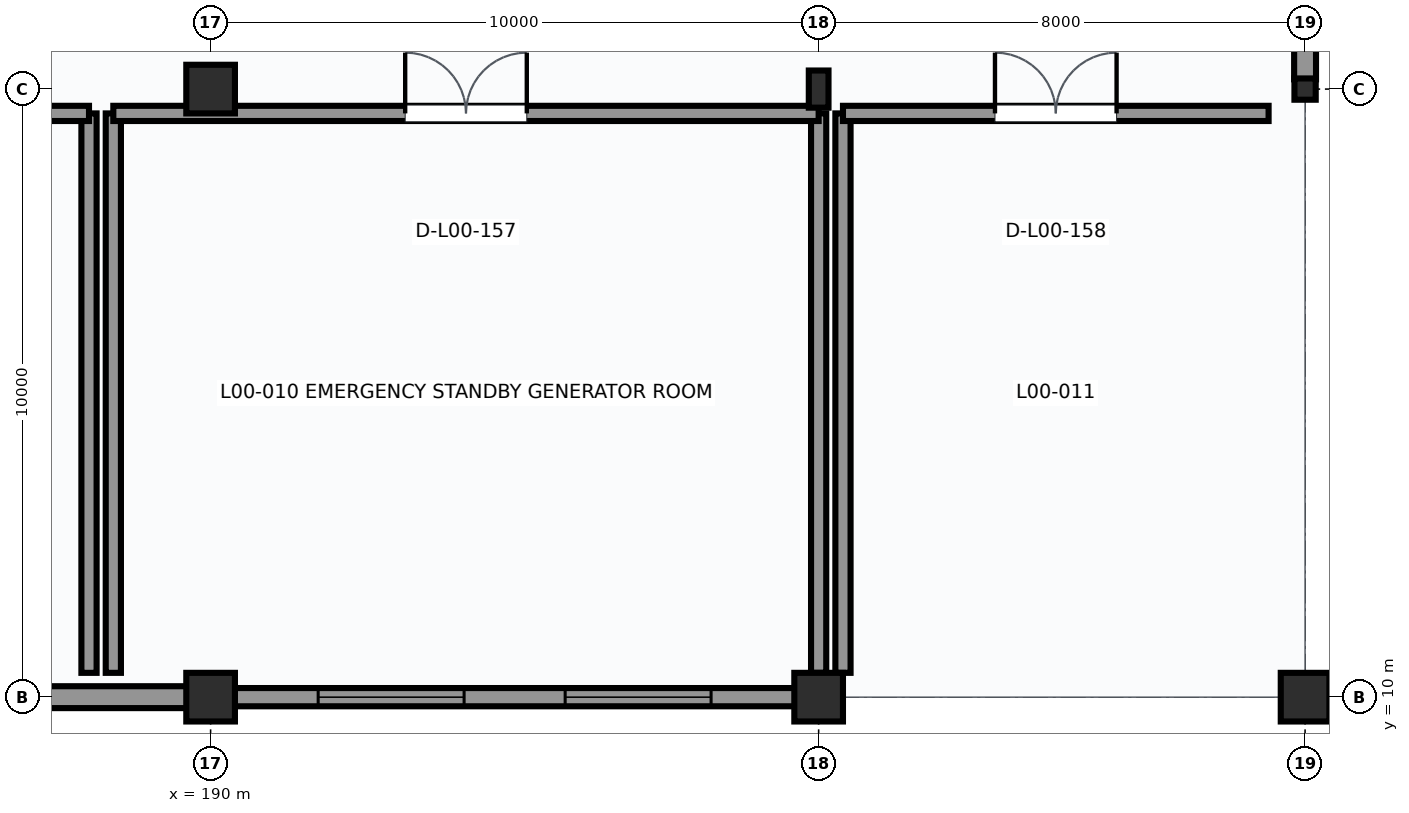
"""IFC4 building model, lengths in metres.
Left out: names, types, materials, properties, quantities, classifications, styles, units other than length and angle.
Written with IfcOpenShell. Run it as: python <this file> out.ifc"""

import sys

from ifc_helpers import new_model, si_unit, direction, frame, frame_2d, origin, origin_2d, place, context, subcontext, project, spatial, rectangle, hollow_rectangle, i_section, extrude, element, fill, save


model = new_model("IFC4")
c1 = context("Model", 3, precision=1e-05, world=origin(), true_north=direction((0.0, 1.0)))
c2 = subcontext(c1, "Body", "Model", "MODEL_VIEW")
j1 = project(units=[si_unit("LENGTHUNIT", "METRE"), si_unit("PLANEANGLEUNIT", "RADIAN")], contexts=[c1])
p1 = place(None, origin())
s1 = spatial("IfcSite", under=j1, at=p1, CompositionType="ELEMENT")
p2 = place(p1, origin())
s2 = spatial("IfcBuilding", under=s1, at=p2, CompositionType="ELEMENT")
p3 = place(p2, origin())
s3 = spatial("IfcBuildingStorey", under=s2, at=p3, CompositionType="ELEMENT", Elevation=0.0)
for number, where, z_axis, x_axis in (
    (1, (190.0, 10.0, 0.0), (0.0, 0.0, 1.0), (1.0, 0.0, 0.0)),
    (2, (190.0, 20.0, 0.0), (0.0, 0.0, 1.0), (1.0, 0.0, 0.0)),
    (3, (200.0, 10.0, 0.0), (0.0, 0.0, 1.0), (1.0, 0.0, 0.0)),
):
    element("IfcColumn", number, at=place(p3, frame(where, z_axis=z_axis, x_axis=x_axis)), inside=s3, PredefinedType="COLUMN", context=c2, shape_type="SweptSolid", body=[
        extrude(rectangle(XDim=0.8, YDim=0.8, at=origin_2d()), origin(), (0.0, 0.0, 1.0), 5.4),
    ])
p4 = place(p3, frame((200.0, 20.0, 0.0), z_axis=(0.0, 0.0, 1.0), x_axis=(1.0, 0.0, 0.0)))
e4 = element("IfcColumn", 4, at=p4, inside=s3, PredefinedType="COLUMN", context=c2, shape_type="SweptSolid", body=[
    extrude(i_section(OverallWidth=0.324, OverallDepth=0.611, WebThickness=0.013, FlangeThickness=0.019, FilletRadius=0.016, at=origin_2d()), origin(), (0.0, 0.0, 1.0), 5.4),
])
p5 = place(p3, frame((208.0, 10.0, 0.0), z_axis=(0.0, 0.0, 1.0), x_axis=(1.0, 0.0, 0.0)))
e5 = element("IfcColumn", 5, at=p5, inside=s3, PredefinedType="COLUMN", context=c2, shape_type="SweptSolid", body=[
    extrude(rectangle(XDim=0.8, YDim=0.8, at=origin_2d()), origin(), (0.0, 0.0, 1.0), 5.4),
])
p6 = place(p3, frame((208.0, 20.0, 0.0), z_axis=(0.0, 0.0, 1.0), x_axis=(1.0, 0.0, 0.0)))
e6 = element("IfcColumn", 6, at=p6, inside=s3, PredefinedType="COLUMN", context=c2, shape_type="SweptSolid", body=[
    extrude(hollow_rectangle(XDim=0.35, YDim=0.35, WallThickness=0.016, InnerFilletRadius=0.016, OuterFilletRadius=0.032, at=origin_2d()), origin(), (0.0, 0.0, 1.0), 5.4),
])
p7 = place(p3, frame((190.385, 10.0, 0.0), z_axis=(0.0, 0.0, 1.0), x_axis=(1.0, 0.0, 0.0)))
e7 = element("IfcWall", 7, at=p7, inside=s3, PredefinedType="SOLIDWALL", context=c2, shape_type="SweptSolid", body=[
    extrude(rectangle(XDim=9.23, YDim=0.3, at=frame_2d((4.615, 0.0))), origin(), (0.0, 0.0, 1.0), 5.06),
])
p8 = place(p7, frame((1.384, 0.0, 0.9)))
e8 = element("IfcOpeningElement", 8, at=p8, cuts=e7, PredefinedType="OPENING", context=c2, shape_type="SweptSolid", body=[
    extrude(rectangle(XDim=2.4, YDim=1.8, at=frame_2d((1.2, 0.9))), frame((0.0, 0.16, 0.0), z_axis=(0.0, -1.0, 0.0), x_axis=(1.0, 0.0, 0.0)), (0.0, 0.0, 1.0), 0.32),
])
p9 = place(p7, frame((5.446, 0.0, 0.9)))
e9 = element("IfcOpeningElement", 9, at=p9, cuts=e7, PredefinedType="OPENING", context=c2, shape_type="SweptSolid", body=[
    extrude(rectangle(XDim=2.4, YDim=2.1, at=frame_2d((1.2, 1.05))), frame((0.0, 0.16, 0.0), z_axis=(0.0, -1.0, 0.0), x_axis=(1.0, 0.0, 0.0)), (0.0, 0.0, 1.0), 0.32),
])
p10 = place(p3, frame((180.385, 10.0, 0.0), z_axis=(0.0, 0.0, 1.0), x_axis=(1.0, 0.0, 0.0)))
e10 = element("IfcWall", 10, at=p10, inside=s3, PredefinedType="SOLIDWALL", context=c2, shape_type="SweptSolid", body=[
    extrude(rectangle(XDim=9.23, YDim=0.36, at=frame_2d((4.615, 0.0))), origin(), (0.0, 0.0, 1.0), 5.06),
])
p11 = place(p10, frame((3.015, 0.0, 0.0)))
e11 = element("IfcOpeningElement", 11, at=p11, cuts=e10, PredefinedType="OPENING", context=c2, shape_type="SweptSolid", body=[
    extrude(rectangle(XDim=3.2, YDim=2.6, at=frame_2d((1.6, 1.3))), frame((0.0, 0.19, 0.0), z_axis=(0.0, -1.0, 0.0), x_axis=(1.0, 0.0, 0.0)), (0.0, 0.0, 1.0), 0.38),
])
p12 = place(p3, frame((208.0, 20.16, 0.0), z_axis=(0.0, 0.0, 1.0), x_axis=(0.0, 1.0, 0.0)))
e12 = element("IfcWall", 12, at=p12, inside=s3, PredefinedType="SOLIDWALL", context=c2, shape_type="SweptSolid", body=[
    extrude(rectangle(XDim=10.455, YDim=0.36, at=frame_2d((5.228, 0.0))), origin(), (0.0, 0.0, 1.0), 4.7),
])
p13 = place(p12, frame((2.978, 0.0, 0.0)))
e13 = element("IfcOpeningElement", 13, at=p13, cuts=e12, PredefinedType="OPENING", context=c2, shape_type="SweptSolid", body=[
    extrude(rectangle(XDim=4.5, YDim=4.4, at=frame_2d((2.25, 2.2))), frame((0.0, 0.19, 0.0), z_axis=(0.0, -1.0, 0.0), x_axis=(1.0, 0.0, 0.0)), (0.0, 0.0, 1.0), 0.38),
])
p14 = place(p3, frame((188.0, 19.6, 0.0), z_axis=(0.0, 0.0, 1.0), x_axis=(0.0, -1.0, 0.0)))
e14 = element("IfcWall", 14, at=p14, inside=s3, PredefinedType="SOLIDWALL", context=c2, shape_type="SweptSolid", body=[
    extrude(rectangle(XDim=9.2, YDim=0.25, at=frame_2d((4.6, 0.0))), origin(), (0.0, 0.0, 1.0), 4.04),
])
p15 = place(p3, frame((168.4, 19.6, 0.0), z_axis=(0.0, 0.0, 1.0), x_axis=(1.0, 0.0, 0.0)))
e15 = element("IfcWall", 15, at=p15, inside=s3, PredefinedType="SOLIDWALL", context=c2, shape_type="SweptSolid", body=[
    extrude(rectangle(XDim=19.6, YDim=0.25, at=frame_2d((9.8, 0.0))), origin(), (0.0, 0.0, 1.0), 4.04),
])
p16 = place(p15, frame((6.448, 0.0, 0.0)))
e16 = element("IfcOpeningElement", 16, at=p16, cuts=e15, PredefinedType="OPENING", context=c2, shape_type="SweptSolid", body=[
    extrude(rectangle(XDim=2.0, YDim=2.4, at=frame_2d((1.0, 1.2))), frame((0.0, 0.135, 0.0), z_axis=(0.0, -1.0, 0.0), x_axis=(1.0, 0.0, 0.0)), (0.0, 0.0, 1.0), 0.27),
])
p17 = place(p3, frame((200.0, 19.6, 0.0), z_axis=(0.0, 0.0, 1.0), x_axis=(0.0, -1.0, 0.0)))
e17 = element("IfcWall", 17, at=p17, inside=s3, PredefinedType="SOLIDWALL", context=c2, shape_type="SweptSolid", body=[
    extrude(rectangle(XDim=9.2, YDim=0.25, at=frame_2d((4.6, 0.0))), origin(), (0.0, 0.0, 1.0), 5.06),
])
p18 = place(p3, frame((188.4, 10.4, 0.0), z_axis=(0.0, 0.0, 1.0), x_axis=(0.0, 1.0, 0.0)))
e18 = element("IfcWall", 18, at=p18, inside=s3, PredefinedType="SOLIDWALL", context=c2, shape_type="SweptSolid", body=[
    extrude(rectangle(XDim=9.2, YDim=0.25, at=frame_2d((4.6, 0.0))), origin(), (0.0, 0.0, 1.0), 4.04),
])
p19 = place(p3, frame((188.4, 19.6, 0.0), z_axis=(0.0, 0.0, 1.0), x_axis=(1.0, 0.0, 0.0)))
e19 = element("IfcWall", 19, at=p19, inside=s3, PredefinedType="SOLIDWALL", context=c2, shape_type="SweptSolid", body=[
    extrude(rectangle(XDim=11.6, YDim=0.25, at=frame_2d((5.8, 0.0))), origin(), (0.0, 0.0, 1.0), 4.04),
])
p20 = place(p19, frame((4.8, 0.0, 0.0)))
e20 = element("IfcOpeningElement", 20, at=p20, cuts=e19, PredefinedType="OPENING", context=c2, shape_type="SweptSolid", body=[
    extrude(rectangle(XDim=2.0, YDim=2.4, at=frame_2d((1.0, 1.2))), frame((0.0, 0.135, 0.0), z_axis=(0.0, -1.0, 0.0), x_axis=(1.0, 0.0, 0.0)), (0.0, 0.0, 1.0), 0.27),
])
p21 = place(p3, frame((200.4, 10.4, 0.0), z_axis=(0.0, 0.0, 1.0), x_axis=(0.0, 1.0, 0.0)))
e21 = element("IfcWall", 21, at=p21, inside=s3, PredefinedType="SOLIDWALL", context=c2, shape_type="SweptSolid", body=[
    extrude(rectangle(XDim=9.2, YDim=0.25, at=frame_2d((4.6, 0.0))), origin(), (0.0, 0.0, 1.0), 5.06),
])
p22 = place(p3, frame((200.4, 19.6, 0.0), z_axis=(0.0, 0.0, 1.0), x_axis=(1.0, 0.0, 0.0)))
e22 = element("IfcWall", 22, at=p22, inside=s3, PredefinedType="SOLIDWALL", context=c2, shape_type="SweptSolid", body=[
    extrude(rectangle(XDim=7.0, YDim=0.25, at=frame_2d((3.5, 0.0))), origin(), (0.0, 0.0, 1.0), 5.06),
])
p23 = place(p22, frame((2.5, 0.0, 0.0)))
e23 = element("IfcOpeningElement", 23, at=p23, cuts=e22, PredefinedType="OPENING", context=c2, shape_type="SweptSolid", body=[
    extrude(rectangle(XDim=2.0, YDim=2.4, at=frame_2d((1.0, 1.2))), frame((0.0, 0.135, 0.0), z_axis=(0.0, -1.0, 0.0), x_axis=(1.0, 0.0, 0.0)), (0.0, 0.0, 1.0), 0.27),
])
p24 = place(p8, origin())
e24 = element("IfcWindow", 24, at=p24, inside=s3, PartitioningType="SINGLE_PANEL", PredefinedType="WINDOW", context=c2, shape_type="SweptSolid", body=[
    extrude(rectangle(XDim=2.4, YDim=1.8, at=frame_2d((1.2, 0.9))), frame((0.0, 0.03, 0.0), z_axis=(0.0, -1.0, 0.0), x_axis=(1.0, 0.0, 0.0)), (0.0, 0.0, 1.0), 0.06),
])
fill(e8, e24)
p25 = place(p9, origin())
e25 = element("IfcWindow", 25, at=p25, inside=s3, PartitioningType="SINGLE_PANEL", PredefinedType="WINDOW", context=c2, shape_type="SweptSolid", body=[
    extrude(rectangle(XDim=2.4, YDim=2.1, at=frame_2d((1.2, 1.05))), frame((0.0, 0.03, 0.0), z_axis=(0.0, -1.0, 0.0), x_axis=(1.0, 0.0, 0.0)), (0.0, 0.0, 1.0), 0.06),
])
fill(e9, e25)
p26 = place(p20, origin())
e26 = element("IfcDoor", 26, at=p26, inside=s3, OperationType="DOUBLE_DOOR_SINGLE_SWING", PredefinedType="DOOR", context=c2, shape_type="SweptSolid", body=[
    extrude(rectangle(XDim=2.0, YDim=2.4, at=frame_2d((1.0, 1.2))), frame((0.0, 0.025, 0.0), z_axis=(0.0, -1.0, 0.0), x_axis=(1.0, 0.0, 0.0)), (0.0, 0.0, 1.0), 0.05),
])
fill(e20, e26)
p27 = place(p23, origin())
e27 = element("IfcDoor", 27, at=p27, inside=s3, OperationType="DOUBLE_DOOR_SINGLE_SWING", PredefinedType="DOOR", context=c2, shape_type="SweptSolid", body=[
    extrude(rectangle(XDim=2.0, YDim=2.4, at=frame_2d((1.0, 1.2))), frame((0.0, 0.025, 0.0), z_axis=(0.0, -1.0, 0.0), x_axis=(1.0, 0.0, 0.0)), (0.0, 0.0, 1.0), 0.05),
])
fill(e23, e27)
save(model, sys.argv[1])
